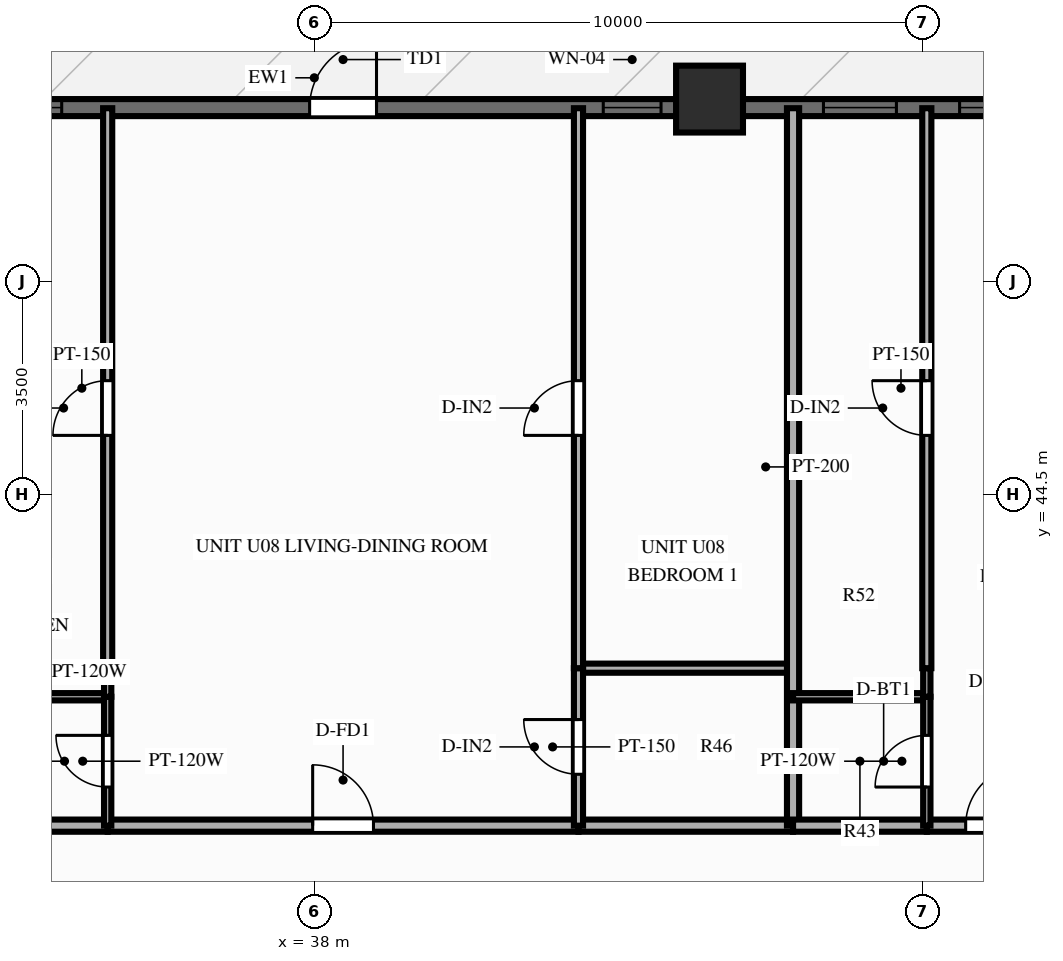
"""IFC4 building model, lengths in metres.
Left out: names, types, materials, properties, quantities, classifications, styles, units other than length and angle.
Written with IfcOpenShell. Run it as: python <this file> out.ifc"""

import sys

from ifc_helpers import new_model, si_unit, direction, frame, frame_2d, origin, origin_2d, place, context, subcontext, project, spatial, rectangle, extrude, source, transform, mapped, element, fill, save


model = new_model("IFC4")
c1 = context("Model", 3, precision=1e-05, world=origin(), true_north=direction((0.0, 1.0)))
c2 = subcontext(c1, "Body", "Model", "MODEL_VIEW")
j1 = project(units=[si_unit("LENGTHUNIT", "METRE"), si_unit("PLANEANGLEUNIT", "RADIAN")], contexts=[c1])
p1 = place(None, origin())
s1 = spatial("IfcSite", under=j1, at=p1, CompositionType="ELEMENT")
p2 = place(p1, origin())
s2 = spatial("IfcBuilding", under=s1, at=p2, CompositionType="ELEMENT")
p3 = place(p2, frame((0.0, 0.0, 22.4)))
s3 = spatial("IfcBuildingStorey", under=s2, at=p3, CompositionType="ELEMENT", Elevation=22.4)
m1 = source(origin(), c2, "Body", "SweptSolid", [
    extrude(rectangle(XDim=1.1, YDim=1.1, at=origin_2d()), origin(), (0.0, 0.0, 1.0), 3.0),
])
p4 = place(p3, frame((44.5, 51.0, 0.0), z_axis=(0.0, 0.0, 1.0), x_axis=(1.0, 0.0, 0.0)))
e1 = element("IfcColumn", 1, at=p4, inside=s3, PredefinedType="COLUMN", context=c2, shape_type="MappedRepresentation", body=[
    mapped(m1, transform((0.0, 0.0, 0.0), scale=1.0)),
])
p5 = place(p3, frame((15.5, 50.86, 0.0), z_axis=(0.0, 0.0, 1.0), x_axis=(1.0, 0.0, 0.0)))
e2 = element("IfcWall", 2, at=p5, inside=s3, PredefinedType="SOLIDWALL", context=c2, shape_type="SweptSolid", body=[
    extrude(rectangle(XDim=45.0, YDim=0.28, at=frame_2d((22.5, 0.0))), origin(), (0.0, 0.0, 1.0), 2.28),
])
p6 = place(p5, frame((0.76, 0.0, 0.25)))
e3 = element("IfcOpeningElement", 3, at=p6, cuts=e2, PredefinedType="OPENING", context=c2, shape_type="SweptSolid", body=[
    extrude(rectangle(XDim=1.2, YDim=1.5, at=frame_2d((0.6, 0.75))), frame((0.0, 0.152, 0.0), z_axis=(0.0, -1.0, 0.0), x_axis=(1.0, 0.0, 0.0)), (0.0, 0.0, 1.0), 0.304),
])
p7 = place(p5, frame((3.494, 0.0, 0.25)))
e4 = element("IfcOpeningElement", 4, at=p7, cuts=e2, PredefinedType="OPENING", context=c2, shape_type="SweptSolid", body=[
    extrude(rectangle(XDim=1.2, YDim=1.5, at=frame_2d((0.6, 0.75))), frame((0.0, 0.152, 0.0), z_axis=(0.0, -1.0, 0.0), x_axis=(1.0, 0.0, 0.0)), (0.0, 0.0, 1.0), 0.304),
])
p8 = place(p5, frame((8.741, 0.0, 0.25)))
e5 = element("IfcOpeningElement", 5, at=p8, cuts=e2, PredefinedType="OPENING", context=c2, shape_type="SweptSolid", body=[
    extrude(rectangle(XDim=1.2, YDim=1.5, at=frame_2d((0.6, 0.75))), frame((0.0, 0.152, 0.0), z_axis=(0.0, -1.0, 0.0), x_axis=(1.0, 0.0, 0.0)), (0.0, 0.0, 1.0), 0.304),
])
p9 = place(p5, frame((13.616, 0.0, 0.25)))
e6 = element("IfcOpeningElement", 6, at=p9, cuts=e2, PredefinedType="OPENING", context=c2, shape_type="SweptSolid", body=[
    extrude(rectangle(XDim=1.2, YDim=1.5, at=frame_2d((0.6, 0.75))), frame((0.0, 0.152, 0.0), z_axis=(0.0, -1.0, 0.0), x_axis=(1.0, 0.0, 0.0)), (0.0, 0.0, 1.0), 0.304),
])
p10 = place(p5, frame((17.146, 0.0, 0.25)))
e7 = element("IfcOpeningElement", 7, at=p10, cuts=e2, PredefinedType="OPENING", context=c2, shape_type="SweptSolid", body=[
    extrude(rectangle(XDim=1.2, YDim=1.5, at=frame_2d((0.6, 0.75))), frame((0.0, 0.152, 0.0), z_axis=(0.0, -1.0, 0.0), x_axis=(1.0, 0.0, 0.0)), (0.0, 0.0, 1.0), 0.304),
])
p11 = place(p5, frame((22.423, 0.0, 0.0)))
e8 = element("IfcOpeningElement", 8, at=p11, cuts=e2, PredefinedType="OPENING", context=c2, shape_type="SweptSolid", body=[
    extrude(rectangle(XDim=1.1, YDim=2.15, at=frame_2d((0.55, 1.075))), frame((0.0, 0.152, 0.0), z_axis=(0.0, -1.0, 0.0), x_axis=(1.0, 0.0, 0.0)), (0.0, 0.0, 1.0), 0.304),
])
p12 = place(p5, frame((27.252, 0.0, 0.25)))
e9 = element("IfcOpeningElement", 9, at=p12, cuts=e2, PredefinedType="OPENING", context=c2, shape_type="SweptSolid", body=[
    extrude(rectangle(XDim=0.95, YDim=1.5, at=frame_2d((0.475, 0.75))), frame((0.0, 0.152, 0.0), z_axis=(0.0, -1.0, 0.0), x_axis=(1.0, 0.0, 0.0)), (0.0, 0.0, 1.0), 0.304),
])
p13 = place(p5, frame((30.873, 0.0, 0.25)))
e10 = element("IfcOpeningElement", 10, at=p13, cuts=e2, PredefinedType="OPENING", context=c2, shape_type="SweptSolid", body=[
    extrude(rectangle(XDim=1.2, YDim=1.5, at=frame_2d((0.6, 0.75))), frame((0.0, 0.152, 0.0), z_axis=(0.0, -1.0, 0.0), x_axis=(1.0, 0.0, 0.0)), (0.0, 0.0, 1.0), 0.304),
])
p14 = place(p5, frame((33.113, 0.0, 0.25)))
e11 = element("IfcOpeningElement", 11, at=p14, cuts=e2, PredefinedType="OPENING", context=c2, shape_type="SweptSolid", body=[
    extrude(rectangle(XDim=1.2, YDim=1.5, at=frame_2d((0.6, 0.75))), frame((0.0, 0.152, 0.0), z_axis=(0.0, -1.0, 0.0), x_axis=(1.0, 0.0, 0.0)), (0.0, 0.0, 1.0), 0.304),
])
p15 = place(p5, frame((35.624, 0.0, 0.25)))
e12 = element("IfcOpeningElement", 12, at=p15, cuts=e2, PredefinedType="OPENING", context=c2, shape_type="SweptSolid", body=[
    extrude(rectangle(XDim=1.2, YDim=1.5, at=frame_2d((0.6, 0.75))), frame((0.0, 0.152, 0.0), z_axis=(0.0, -1.0, 0.0), x_axis=(1.0, 0.0, 0.0)), (0.0, 0.0, 1.0), 0.304),
])
p16 = place(p5, frame((38.097, 0.0, 0.25)))
e13 = element("IfcOpeningElement", 13, at=p16, cuts=e2, PredefinedType="OPENING", context=c2, shape_type="SweptSolid", body=[
    extrude(rectangle(XDim=1.2, YDim=1.5, at=frame_2d((0.6, 0.75))), frame((0.0, 0.152, 0.0), z_axis=(0.0, -1.0, 0.0), x_axis=(1.0, 0.0, 0.0)), (0.0, 0.0, 1.0), 0.304),
])
p17 = place(p5, frame((40.336, 0.0, 0.25)))
e14 = element("IfcOpeningElement", 14, at=p17, cuts=e2, PredefinedType="OPENING", context=c2, shape_type="SweptSolid", body=[
    extrude(rectangle(XDim=1.2, YDim=1.5, at=frame_2d((0.6, 0.75))), frame((0.0, 0.152, 0.0), z_axis=(0.0, -1.0, 0.0), x_axis=(1.0, 0.0, 0.0)), (0.0, 0.0, 1.0), 0.304),
])
p18 = place(p5, frame((42.743, 0.0, 0.25)))
e15 = element("IfcOpeningElement", 15, at=p18, cuts=e2, PredefinedType="OPENING", context=c2, shape_type="SweptSolid", body=[
    extrude(rectangle(XDim=1.2, YDim=1.5, at=frame_2d((0.6, 0.75))), frame((0.0, 0.152, 0.0), z_axis=(0.0, -1.0, 0.0), x_axis=(1.0, 0.0, 0.0)), (0.0, 0.0, 1.0), 0.304),
])
p19 = place(p3, frame((31.852, 39.05, 0.0), z_axis=(0.0, 0.0, 1.0), x_axis=(1.0, 0.0, 0.0)))
e16 = element("IfcWall", 16, at=p19, inside=s3, PredefinedType="PARTITIONING", context=c2, shape_type="SweptSolid", body=[
    extrude(rectangle(XDim=2.75, YDim=0.2, at=frame_2d((1.375, 0.0))), origin(), (0.0, 0.0, 1.0), 2.79),
])
p20 = place(p3, frame((34.602, 39.05, 0.0), z_axis=(0.0, 0.0, 1.0), x_axis=(1.0, 0.0, 0.0)))
e17 = element("IfcWall", 17, at=p20, inside=s3, PredefinedType="PARTITIONING", context=c2, shape_type="SweptSolid", body=[
    extrude(rectangle(XDim=7.743, YDim=0.2, at=frame_2d((3.871, 0.0))), origin(), (0.0, 0.0, 1.0), 2.79),
])
p21 = place(p20, frame((3.371, 0.0, 0.0)))
e18 = element("IfcOpeningElement", 18, at=p21, cuts=e17, PredefinedType="OPENING", context=c2, shape_type="SweptSolid", body=[
    extrude(rectangle(XDim=1.0, YDim=2.15, at=frame_2d((0.5, 1.075))), frame((0.0, 0.112, 0.0), z_axis=(0.0, -1.0, 0.0), x_axis=(1.0, 0.0, 0.0)), (0.0, 0.0, 1.0), 0.224),
])
p22 = place(p3, frame((42.344, 39.05, 0.0), z_axis=(0.0, 0.0, 1.0), x_axis=(1.0, 0.0, 0.0)))
e19 = element("IfcWall", 19, at=p22, inside=s3, PredefinedType="PARTITIONING", context=c2, shape_type="SweptSolid", body=[
    extrude(rectangle(XDim=3.529, YDim=0.2, at=frame_2d((1.764, 0.0))), origin(), (0.0, 0.0, 1.0), 2.79),
])
p23 = place(p3, frame((31.852, 41.17, 0.0), z_axis=(0.0, 0.0, 1.0), x_axis=(1.0, 0.0, 0.0)))
e20 = element("IfcWall", 20, at=p23, inside=s3, PredefinedType="PARTITIONING", context=c2, shape_type="SweptSolid", body=[
    extrude(rectangle(XDim=2.75, YDim=0.12, at=frame_2d((1.375, 0.0))), origin(), (0.0, 0.0, 1.0), 2.79),
])
p24 = place(p3, frame((42.344, 41.64, 0.0), z_axis=(0.0, 0.0, 1.0), x_axis=(1.0, 0.0, 0.0)))
e21 = element("IfcWall", 21, at=p24, inside=s3, PredefinedType="PARTITIONING", context=c2, shape_type="SweptSolid", body=[
    extrude(rectangle(XDim=3.529, YDim=0.15, at=frame_2d((1.764, 0.0))), origin(), (0.0, 0.0, 1.0), 2.79),
])
p25 = place(p3, frame((34.602, 39.05, 0.0), z_axis=(0.0, 0.0, 1.0), x_axis=(0.0, 1.0, 0.0)))
e22 = element("IfcWall", 22, at=p25, inside=s3, PredefinedType="PARTITIONING", context=c2, shape_type="SweptSolid", body=[
    extrude(rectangle(XDim=2.12, YDim=0.12, at=frame_2d((1.06, 0.0))), origin(), (0.0, 0.0, 1.0), 2.79),
])
p26 = place(p25, frame((0.635, 0.0, 0.0)))
e23 = element("IfcOpeningElement", 23, at=p26, cuts=e22, PredefinedType="OPENING", context=c2, shape_type="SweptSolid", body=[
    extrude(rectangle(XDim=0.85, YDim=2.05, at=frame_2d((0.425, 1.025))), frame((0.0, 0.072, 0.0), z_axis=(0.0, -1.0, 0.0), x_axis=(1.0, 0.0, 0.0)), (0.0, 0.0, 1.0), 0.144),
])
p27 = place(p3, frame((34.602, 41.17, 0.0), z_axis=(0.0, 0.0, 1.0), x_axis=(0.0, 1.0, 0.0)))
e24 = element("IfcWall", 24, at=p27, inside=s3, PredefinedType="PARTITIONING", context=c2, shape_type="SweptSolid", body=[
    extrude(rectangle(XDim=0.47, YDim=0.12, at=frame_2d((0.235, 0.0))), origin(), (0.0, 0.0, 1.0), 2.79),
])
p28 = place(p3, frame((34.602, 41.64, 0.0), z_axis=(0.0, 0.0, 1.0), x_axis=(0.0, 1.0, 0.0)))
e25 = element("IfcWall", 25, at=p28, inside=s3, PredefinedType="PARTITIONING", context=c2, shape_type="SweptSolid", body=[
    extrude(rectangle(XDim=9.21, YDim=0.15, at=frame_2d((4.605, 0.0))), origin(), (0.0, 0.0, 1.0), 2.79),
])
p29 = place(p28, frame((3.829, 0.0, 0.0)))
e26 = element("IfcOpeningElement", 26, at=p29, cuts=e25, PredefinedType="OPENING", context=c2, shape_type="SweptSolid", body=[
    extrude(rectangle(XDim=0.9, YDim=2.1, at=frame_2d((0.45, 1.05))), frame((0.0, 0.087, 0.0), z_axis=(0.0, -1.0, 0.0), x_axis=(1.0, 0.0, 0.0)), (0.0, 0.0, 1.0), 0.174),
])
p30 = place(p3, frame((42.344, 39.05, 0.0), z_axis=(0.0, 0.0, 1.0), x_axis=(0.0, 1.0, 0.0)))
e27 = element("IfcWall", 27, at=p30, inside=s3, PredefinedType="PARTITIONING", context=c2, shape_type="SweptSolid", body=[
    extrude(rectangle(XDim=2.59, YDim=0.15, at=frame_2d((1.295, 0.0))), origin(), (0.0, 0.0, 1.0), 2.79),
])
p31 = place(p30, frame((0.845, 0.0, 0.0)))
e28 = element("IfcOpeningElement", 28, at=p31, cuts=e27, PredefinedType="OPENING", context=c2, shape_type="SweptSolid", body=[
    extrude(rectangle(XDim=0.9, YDim=2.1, at=frame_2d((0.45, 1.05))), frame((0.0, 0.087, 0.0), z_axis=(0.0, -1.0, 0.0), x_axis=(1.0, 0.0, 0.0)), (0.0, 0.0, 1.0), 0.174),
])
p32 = place(p3, frame((42.344, 41.64, 0.0), z_axis=(0.0, 0.0, 1.0), x_axis=(0.0, 1.0, 0.0)))
e29 = element("IfcWall", 29, at=p32, inside=s3, PredefinedType="PARTITIONING", context=c2, shape_type="SweptSolid", body=[
    extrude(rectangle(XDim=9.21, YDim=0.15, at=frame_2d((4.605, 0.0))), origin(), (0.0, 0.0, 1.0), 2.79),
])
p33 = place(p32, frame((3.829, 0.0, 0.0)))
e30 = element("IfcOpeningElement", 30, at=p33, cuts=e29, PredefinedType="OPENING", context=c2, shape_type="SweptSolid", body=[
    extrude(rectangle(XDim=0.9, YDim=2.1, at=frame_2d((0.45, 1.05))), frame((0.0, 0.087, 0.0), z_axis=(0.0, -1.0, 0.0), x_axis=(1.0, 0.0, 0.0)), (0.0, 0.0, 1.0), 0.174),
])
p34 = place(p3, frame((45.873, 39.05, 0.0), z_axis=(0.0, 0.0, 1.0), x_axis=(0.0, 1.0, 0.0)))
e31 = element("IfcWall", 31, at=p34, inside=s3, PredefinedType="PARTITIONING", context=c2, shape_type="SweptSolid", body=[
    extrude(rectangle(XDim=11.8, YDim=0.2, at=frame_2d((5.9, 0.0))), origin(), (0.0, 0.0, 1.0), 2.79),
])
p35 = place(p3, frame((45.873, 39.05, 0.0), z_axis=(0.0, 0.0, 1.0), x_axis=(1.0, 0.0, 0.0)))
e32 = element("IfcWall", 32, at=p35, inside=s3, PredefinedType="PARTITIONING", context=c2, shape_type="SweptSolid", body=[
    extrude(rectangle(XDim=2.2, YDim=0.2, at=frame_2d((1.1, 0.0))), origin(), (0.0, 0.0, 1.0), 2.79),
])
p36 = place(p3, frame((48.073, 39.05, 0.0), z_axis=(0.0, 0.0, 1.0), x_axis=(1.0, 0.0, 0.0)))
e33 = element("IfcWall", 33, at=p36, inside=s3, PredefinedType="PARTITIONING", context=c2, shape_type="SweptSolid", body=[
    extrude(rectangle(XDim=2.278, YDim=0.2, at=frame_2d((1.139, 0.0))), origin(), (0.0, 0.0, 1.0), 2.79),
])
p37 = place(p36, frame((0.639, 0.0, 0.0)))
e34 = element("IfcOpeningElement", 34, at=p37, cuts=e33, PredefinedType="OPENING", context=c2, shape_type="SweptSolid", body=[
    extrude(rectangle(XDim=1.0, YDim=2.15, at=frame_2d((0.5, 1.075))), frame((0.0, 0.112, 0.0), z_axis=(0.0, -1.0, 0.0), x_axis=(1.0, 0.0, 0.0)), (0.0, 0.0, 1.0), 0.224),
])
p38 = place(p3, frame((45.873, 41.17, 0.0), z_axis=(0.0, 0.0, 1.0), x_axis=(1.0, 0.0, 0.0)))
e35 = element("IfcWall", 35, at=p38, inside=s3, PredefinedType="PARTITIONING", context=c2, shape_type="SweptSolid", body=[
    extrude(rectangle(XDim=2.2, YDim=0.12, at=frame_2d((1.1, 0.0))), origin(), (0.0, 0.0, 1.0), 2.79),
])
p39 = place(p3, frame((48.073, 39.05, 0.0), z_axis=(0.0, 0.0, 1.0), x_axis=(0.0, 1.0, 0.0)))
e36 = element("IfcWall", 36, at=p39, inside=s3, PredefinedType="PARTITIONING", context=c2, shape_type="SweptSolid", body=[
    extrude(rectangle(XDim=2.12, YDim=0.12, at=frame_2d((1.06, 0.0))), origin(), (0.0, 0.0, 1.0), 2.79),
])
p40 = place(p39, frame((0.635, 0.0, 0.0)))
e37 = element("IfcOpeningElement", 37, at=p40, cuts=e36, PredefinedType="OPENING", context=c2, shape_type="SweptSolid", body=[
    extrude(rectangle(XDim=0.85, YDim=2.05, at=frame_2d((0.425, 1.025))), frame((0.0, 0.072, 0.0), z_axis=(0.0, -1.0, 0.0), x_axis=(1.0, 0.0, 0.0)), (0.0, 0.0, 1.0), 0.144),
])
p41 = place(p3, frame((48.073, 41.17, 0.0), z_axis=(0.0, 0.0, 1.0), x_axis=(0.0, 1.0, 0.0)))
e38 = element("IfcWall", 38, at=p41, inside=s3, PredefinedType="PARTITIONING", context=c2, shape_type="SweptSolid", body=[
    extrude(rectangle(XDim=0.47, YDim=0.12, at=frame_2d((0.235, 0.0))), origin(), (0.0, 0.0, 1.0), 2.79),
])
p42 = place(p3, frame((48.073, 41.64, 0.0), z_axis=(0.0, 0.0, 1.0), x_axis=(0.0, 1.0, 0.0)))
e39 = element("IfcWall", 39, at=p42, inside=s3, PredefinedType="PARTITIONING", context=c2, shape_type="SweptSolid", body=[
    extrude(rectangle(XDim=9.21, YDim=0.15, at=frame_2d((4.605, 0.0))), origin(), (0.0, 0.0, 1.0), 2.79),
])
p43 = place(p42, frame((3.829, 0.0, 0.0)))
e40 = element("IfcOpeningElement", 40, at=p43, cuts=e39, PredefinedType="OPENING", context=c2, shape_type="SweptSolid", body=[
    extrude(rectangle(XDim=0.9, YDim=2.1, at=frame_2d((0.45, 1.05))), frame((0.0, 0.087, 0.0), z_axis=(0.0, -1.0, 0.0), x_axis=(1.0, 0.0, 0.0)), (0.0, 0.0, 1.0), 0.174),
])
m2 = source(origin(), c2, "Body", "SweptSolid", [
    extrude(rectangle(XDim=1.2, YDim=1.5, at=frame_2d((0.6, 0.75))), frame((0.0, 0.03, 0.0), z_axis=(0.0, -1.0, 0.0), x_axis=(1.0, 0.0, 0.0)), (0.0, 0.0, 1.0), 0.06),
])
p44 = place(p10, origin())
e41 = element("IfcWindow", 41, at=p44, inside=s3, PartitioningType="SINGLE_PANEL", PredefinedType="WINDOW", context=c2, shape_type="MappedRepresentation", body=[
    mapped(m2, transform((0.0, 0.0, 0.0), scale=1.0)),
])
fill(e7, e41)
m3 = source(origin(), c2, "Body", "SweptSolid", [
    extrude(rectangle(XDim=1.1, YDim=2.15, at=frame_2d((0.55, 1.075))), frame((0.0, 0.025, 0.0), z_axis=(0.0, -1.0, 0.0), x_axis=(1.0, 0.0, 0.0)), (0.0, 0.0, 1.0), 0.05),
])
p45 = place(p11, origin())
e42 = element("IfcDoor", 42, at=p45, inside=s3, OperationType="SINGLE_SWING_RIGHT", PredefinedType="DOOR", context=c2, shape_type="MappedRepresentation", body=[
    mapped(m3, transform((0.0, 0.0, 0.0), scale=1.0)),
])
fill(e8, e42)
m4 = source(origin(), c2, "Body", "SweptSolid", [
    extrude(rectangle(XDim=0.95, YDim=1.5, at=frame_2d((0.475, 0.75))), frame((0.0, 0.03, 0.0), z_axis=(0.0, -1.0, 0.0), x_axis=(1.0, 0.0, 0.0)), (0.0, 0.0, 1.0), 0.06),
])
p46 = place(p12, origin())
e43 = element("IfcWindow", 43, at=p46, inside=s3, PartitioningType="SINGLE_PANEL", PredefinedType="WINDOW", context=c2, shape_type="MappedRepresentation", body=[
    mapped(m4, transform((0.0, 0.0, 0.0), scale=1.0)),
])
fill(e9, e43)
p47 = place(p13, origin())
e44 = element("IfcWindow", 44, at=p47, inside=s3, PartitioningType="SINGLE_PANEL", PredefinedType="WINDOW", context=c2, shape_type="MappedRepresentation", body=[
    mapped(m2, transform((0.0, 0.0, 0.0), scale=1.0)),
])
fill(e10, e44)
p48 = place(p14, origin())
e45 = element("IfcWindow", 45, at=p48, inside=s3, PartitioningType="SINGLE_PANEL", PredefinedType="WINDOW", context=c2, shape_type="MappedRepresentation", body=[
    mapped(m2, transform((0.0, 0.0, 0.0), scale=1.0)),
])
fill(e11, e45)
m5 = source(origin(), c2, "Body", "SweptSolid", [
    extrude(rectangle(XDim=1.0, YDim=2.15, at=frame_2d((0.5, 1.075))), frame((0.0, 0.025, 0.0), z_axis=(0.0, -1.0, 0.0), x_axis=(1.0, 0.0, 0.0)), (0.0, 0.0, 1.0), 0.05),
])
p49 = place(p21, origin())
e46 = element("IfcDoor", 46, at=p49, inside=s3, OperationType="SINGLE_SWING_LEFT", PredefinedType="DOOR", context=c2, shape_type="MappedRepresentation", body=[
    mapped(m5, transform((0.0, 0.0, 0.0), scale=1.0)),
])
fill(e18, e46)
m6 = source(origin(), c2, "Body", "SweptSolid", [
    extrude(rectangle(XDim=0.85, YDim=2.05, at=frame_2d((0.425, 1.025))), frame((0.0, 0.025, 0.0), z_axis=(0.0, -1.0, 0.0), x_axis=(1.0, 0.0, 0.0)), (0.0, 0.0, 1.0), 0.05),
])
p50 = place(p26, origin())
e47 = element("IfcDoor", 47, at=p50, inside=s3, OperationType="SINGLE_SWING_RIGHT", PredefinedType="DOOR", context=c2, shape_type="MappedRepresentation", body=[
    mapped(m6, transform((0.0, 0.0, 0.0), scale=1.0)),
])
fill(e23, e47)
m7 = source(origin(), c2, "Body", "SweptSolid", [
    extrude(rectangle(XDim=0.9, YDim=2.1, at=frame_2d((0.45, 1.05))), frame((0.0, 0.025, 0.0), z_axis=(0.0, -1.0, 0.0), x_axis=(1.0, 0.0, 0.0)), (0.0, 0.0, 1.0), 0.05),
])
p51 = place(p29, origin())
e48 = element("IfcDoor", 48, at=p51, inside=s3, OperationType="SINGLE_SWING_LEFT", PredefinedType="DOOR", context=c2, shape_type="MappedRepresentation", body=[
    mapped(m7, transform((0.0, 0.0, 0.0), scale=1.0)),
])
fill(e26, e48)
p52 = place(p31, origin())
e49 = element("IfcDoor", 49, at=p52, inside=s3, OperationType="SINGLE_SWING_RIGHT", PredefinedType="DOOR", context=c2, shape_type="MappedRepresentation", body=[
    mapped(m7, transform((0.0, 0.0, 0.0), scale=1.0)),
])
fill(e28, e49)
p53 = place(p33, origin())
e50 = element("IfcDoor", 50, at=p53, inside=s3, OperationType="SINGLE_SWING_LEFT", PredefinedType="DOOR", context=c2, shape_type="MappedRepresentation", body=[
    mapped(m7, transform((0.0, 0.0, 0.0), scale=1.0)),
])
fill(e30, e50)
p54 = place(p37, origin())
e51 = element("IfcDoor", 51, at=p54, inside=s3, OperationType="SINGLE_SWING_RIGHT", PredefinedType="DOOR", context=c2, shape_type="MappedRepresentation", body=[
    mapped(m5, transform((0.0, 0.0, 0.0), scale=1.0)),
])
fill(e34, e51)
p55 = place(p40, origin())
e52 = element("IfcDoor", 52, at=p55, inside=s3, OperationType="SINGLE_SWING_LEFT", PredefinedType="DOOR", context=c2, shape_type="MappedRepresentation", body=[
    mapped(m6, transform((0.0, 0.0, 0.0), scale=1.0)),
])
fill(e37, e52)
p56 = place(p43, origin())
e53 = element("IfcDoor", 53, at=p56, inside=s3, OperationType="SINGLE_SWING_RIGHT", PredefinedType="DOOR", context=c2, shape_type="MappedRepresentation", body=[
    mapped(m7, transform((0.0, 0.0, 0.0), scale=1.0)),
])
fill(e40, e53)
save(model, sys.argv[1])
